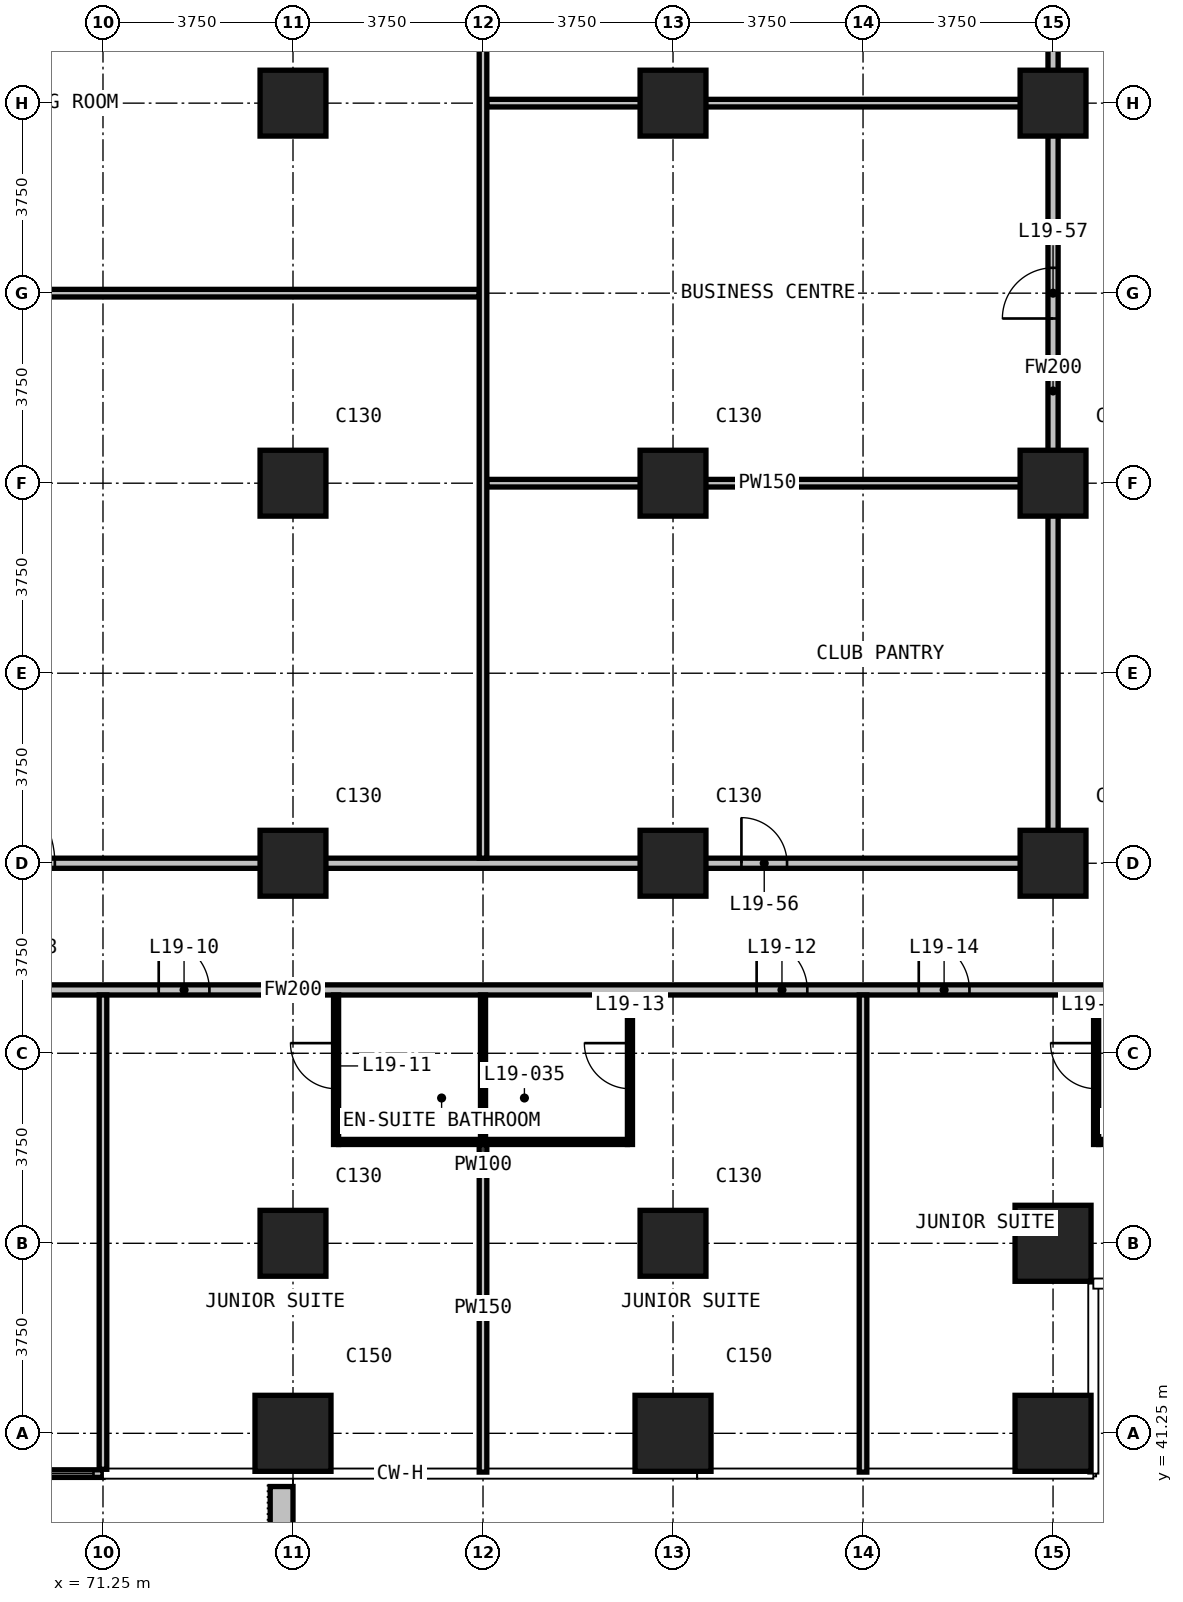
"""IFC4 building model, lengths in metres.
Left out: names, types, materials, properties, quantities, classifications, styles, units other than length and angle.
Written with IfcOpenShell. Run it as: python <this file> out.ifc"""

import sys

from ifc_helpers import new_model, si_unit, direction, frame, frame_2d, origin, origin_2d, place, context, subcontext, project, spatial, rectangle, extrude, element, fill, save


model = new_model("IFC4")
c1 = context("Model", 3, precision=1e-05, world=origin(), true_north=direction((0.0, 1.0)))
c2 = subcontext(c1, "Body", "Model", "MODEL_VIEW")
j1 = project(units=[si_unit("LENGTHUNIT", "METRE"), si_unit("PLANEANGLEUNIT", "RADIAN")], contexts=[c1])
p1 = place(None, origin())
s1 = spatial("IfcSite", under=j1, at=p1, CompositionType="ELEMENT")
p2 = place(p1, origin())
s2 = spatial("IfcBuilding", under=s1, at=p2, CompositionType="ELEMENT")
p3 = place(p2, frame((0.0, 0.0, 82.4)))
s3 = spatial("IfcBuildingStorey", under=s2, at=p3, CompositionType="ELEMENT", Elevation=82.4)
p4 = place(p3, frame((75.0, 41.25, 0.0), z_axis=(0.0, 0.0, 1.0), x_axis=(1.0, 0.0, 0.0)))
e1 = element("IfcColumn", 1, at=p4, inside=s3, PredefinedType="COLUMN", context=c2, shape_type="SweptSolid", body=[
    extrude(rectangle(XDim=1.5, YDim=1.5, at=origin_2d()), origin(), (0.0, 0.0, 1.0), 3.3),
])
for number, where, z_axis, x_axis in (
    (2, (75.0, 45.0, 0.0), (0.0, 0.0, 1.0), (1.0, 0.0, 0.0)),
    (3, (75.0, 52.5, 0.0), (0.0, 0.0, 1.0), (1.0, 0.0, 0.0)),
    (4, (75.0, 60.0, 0.0), (0.0, 0.0, 1.0), (1.0, 0.0, 0.0)),
    (5, (75.0, 67.5, 0.0), (0.0, 0.0, 1.0), (1.0, 0.0, 0.0)),
):
    element("IfcColumn", number, at=place(p3, frame(where, z_axis=z_axis, x_axis=x_axis)), inside=s3, PredefinedType="COLUMN", context=c2, shape_type="SweptSolid", body=[
        extrude(rectangle(XDim=1.3, YDim=1.3, at=origin_2d()), origin(), (0.0, 0.0, 1.0), 3.3),
    ])
p5 = place(p3, frame((82.5, 41.25, 0.0), z_axis=(0.0, 0.0, 1.0), x_axis=(1.0, 0.0, 0.0)))
e6 = element("IfcColumn", 6, at=p5, inside=s3, PredefinedType="COLUMN", context=c2, shape_type="SweptSolid", body=[
    extrude(rectangle(XDim=1.5, YDim=1.5, at=origin_2d()), origin(), (0.0, 0.0, 1.0), 3.3),
])
for number, where, z_axis, x_axis in (
    (7, (82.5, 45.0, 0.0), (0.0, 0.0, 1.0), (1.0, 0.0, 0.0)),
    (8, (82.5, 52.5, 0.0), (0.0, 0.0, 1.0), (1.0, 0.0, 0.0)),
    (9, (82.5, 60.0, 0.0), (0.0, 0.0, 1.0), (1.0, 0.0, 0.0)),
    (10, (82.5, 67.5, 0.0), (0.0, 0.0, 1.0), (1.0, 0.0, 0.0)),
):
    element("IfcColumn", number, at=place(p3, frame(where, z_axis=z_axis, x_axis=x_axis)), inside=s3, PredefinedType="COLUMN", context=c2, shape_type="SweptSolid", body=[
        extrude(rectangle(XDim=1.3, YDim=1.3, at=origin_2d()), origin(), (0.0, 0.0, 1.0), 3.3),
    ])
for number, where, z_axis, x_axis in (
    (11, (90.0, 41.25, 0.0), (0.0, 0.0, 1.0), (1.0, 0.0, 0.0)),
    (12, (90.0, 45.0, 0.0), (0.0, 0.0, 1.0), (1.0, 0.0, 0.0)),
):
    element("IfcColumn", number, at=place(p3, frame(where, z_axis=z_axis, x_axis=x_axis)), inside=s3, PredefinedType="COLUMN", context=c2, shape_type="SweptSolid", body=[
        extrude(rectangle(XDim=1.5, YDim=1.5, at=origin_2d()), origin(), (0.0, 0.0, 1.0), 3.3),
    ])
for number, where, z_axis, x_axis in (
    (13, (90.0, 52.5, 0.0), (0.0, 0.0, 1.0), (1.0, 0.0, 0.0)),
    (14, (90.0, 60.0, 0.0), (0.0, 0.0, 1.0), (1.0, 0.0, 0.0)),
    (15, (90.0, 67.5, 0.0), (0.0, 0.0, 1.0), (1.0, 0.0, 0.0)),
):
    element("IfcColumn", number, at=place(p3, frame(where, z_axis=z_axis, x_axis=x_axis)), inside=s3, PredefinedType="COLUMN", context=c2, shape_type="SweptSolid", body=[
        extrude(rectangle(XDim=1.3, YDim=1.3, at=origin_2d()), origin(), (0.0, 0.0, 1.0), 3.3),
    ])
p6 = place(p3, frame((67.5, 40.455, 0.0), z_axis=(0.0, 0.0, 1.0), x_axis=(1.0, 0.0, 0.0)))
e16 = element("IfcWall", 16, at=p6, inside=s3, PredefinedType="SOLIDWALL", context=c2, shape_type="SweptSolid", body=[
    extrude(rectangle(XDim=3.75, YDim=0.15, at=frame_2d((1.875, 0.0))), origin(), (0.0, 0.0, 1.0), 3.0),
])
p7 = place(p6, frame((1.275, 0.0, 0.0)))
e17 = element("IfcOpeningElement", 17, at=p7, cuts=e16, PredefinedType="OPENING", context=c2, shape_type="SweptSolid", body=[
    extrude(rectangle(XDim=1.2, YDim=2.4, at=frame_2d((0.6, 1.2))), frame((0.0, 0.085, 0.0), z_axis=(0.0, -1.0, 0.0), x_axis=(1.0, 0.0, 0.0)), (0.0, 0.0, 1.0), 0.17),
])
p8 = place(p6, frame((2.663, 0.0, 0.1)))
e18 = element("IfcOpeningElement", 18, at=p8, cuts=e16, PredefinedType="OPENING", context=c2, shape_type="SweptSolid", body=[
    extrude(rectangle(XDim=0.9, YDim=2.4, at=frame_2d((0.45, 1.2))), frame((0.0, 0.085, 0.0), z_axis=(0.0, -1.0, 0.0), x_axis=(1.0, 0.0, 0.0)), (0.0, 0.0, 1.0), 0.17),
])
p9 = place(p3, frame((74.775, 40.2, 0.0), z_axis=(0.0, 0.0, 1.0), x_axis=(0.0, -1.0, 0.0)))
e19 = element("IfcWall", 19, at=p9, inside=s3, PredefinedType="USERDEFINED", context=c2, shape_type="SweptSolid", body=[
    extrude(rectangle(XDim=2.35, YDim=0.45, at=frame_2d((1.175, 0.0))), origin(), (0.0, 0.0, 1.0), 1.1),
])
p10 = place(p3, frame((51.735, 50.0, 0.0), z_axis=(0.0, 0.0, 1.0), x_axis=(1.0, 0.0, 0.0)))
e20 = element("IfcWall", 20, at=p10, inside=s3, PredefinedType="PARTITIONING", context=c2, shape_type="SweptSolid", body=[
    extrude(rectangle(XDim=46.53, YDim=0.2, at=frame_2d((23.265, 0.0))), origin(), (0.0, 0.0, 1.0), 3.0),
])
p11 = place(p10, frame((5.615, 0.0, 0.0)))
e21 = element("IfcOpeningElement", 21, at=p11, cuts=e20, PredefinedType="OPENING", context=c2, shape_type="SweptSolid", body=[
    extrude(rectangle(XDim=1.0, YDim=2.2, at=frame_2d((0.5, 1.1))), frame((0.0, 0.11, 0.0), z_axis=(0.0, -1.0, 0.0), x_axis=(1.0, 0.0, 0.0)), (0.0, 0.0, 1.0), 0.22),
])
p12 = place(p10, frame((17.415, 0.0, 0.0)))
e22 = element("IfcOpeningElement", 22, at=p12, cuts=e20, PredefinedType="OPENING", context=c2, shape_type="SweptSolid", body=[
    extrude(rectangle(XDim=1.0, YDim=2.2, at=frame_2d((0.5, 1.1))), frame((0.0, 0.11, 0.0), z_axis=(0.0, -1.0, 0.0), x_axis=(1.0, 0.0, 0.0)), (0.0, 0.0, 1.0), 0.22),
])
p13 = place(p10, frame((20.615, 0.0, 0.0)))
e23 = element("IfcOpeningElement", 23, at=p13, cuts=e20, PredefinedType="OPENING", context=c2, shape_type="SweptSolid", body=[
    extrude(rectangle(XDim=1.0, YDim=2.2, at=frame_2d((0.5, 1.1))), frame((0.0, 0.11, 0.0), z_axis=(0.0, -1.0, 0.0), x_axis=(1.0, 0.0, 0.0)), (0.0, 0.0, 1.0), 0.22),
])
p14 = place(p10, frame((32.415, 0.0, 0.0)))
e24 = element("IfcOpeningElement", 24, at=p14, cuts=e20, PredefinedType="OPENING", context=c2, shape_type="SweptSolid", body=[
    extrude(rectangle(XDim=1.0, YDim=2.2, at=frame_2d((0.5, 1.1))), frame((0.0, 0.11, 0.0), z_axis=(0.0, -1.0, 0.0), x_axis=(1.0, 0.0, 0.0)), (0.0, 0.0, 1.0), 0.22),
])
p15 = place(p10, frame((35.615, 0.0, 0.0)))
e25 = element("IfcOpeningElement", 25, at=p15, cuts=e20, PredefinedType="OPENING", context=c2, shape_type="SweptSolid", body=[
    extrude(rectangle(XDim=1.0, YDim=2.2, at=frame_2d((0.5, 1.1))), frame((0.0, 0.11, 0.0), z_axis=(0.0, -1.0, 0.0), x_axis=(1.0, 0.0, 0.0)), (0.0, 0.0, 1.0), 0.22),
])
p16 = place(p10, frame((1.8, 0.0, 0.0)))
e26 = element("IfcOpeningElement", 26, at=p16, cuts=e20, PredefinedType="OPENING", context=c2, shape_type="SweptSolid", body=[
    extrude(rectangle(XDim=0.9, YDim=2.2, at=frame_2d((0.45, 1.1))), frame((0.0, 0.11, 0.0), z_axis=(0.0, -1.0, 0.0), x_axis=(1.0, 0.0, 0.0)), (0.0, 0.0, 1.0), 0.22),
])
p17 = place(p10, frame((43.815, 0.0, 0.0)))
e27 = element("IfcOpeningElement", 27, at=p17, cuts=e20, PredefinedType="OPENING", context=c2, shape_type="SweptSolid", body=[
    extrude(rectangle(XDim=0.9, YDim=2.2, at=frame_2d((0.45, 1.1))), frame((0.0, 0.11, 0.0), z_axis=(0.0, -1.0, 0.0), x_axis=(1.0, 0.0, 0.0)), (0.0, 0.0, 1.0), 0.22),
])
p18 = place(p3, frame((60.1, 52.5, 0.0), z_axis=(0.0, 0.0, 1.0), x_axis=(1.0, 0.0, 0.0)))
e28 = element("IfcWall", 28, at=p18, inside=s3, PredefinedType="PARTITIONING", context=c2, shape_type="SweptSolid", body=[
    extrude(rectangle(XDim=29.8, YDim=0.2, at=frame_2d((14.9, 0.0))), origin(), (0.0, 0.0, 1.0), 3.0),
])
p19 = place(p18, frame((8.4, 0.0, 0.0)))
e29 = element("IfcOpeningElement", 29, at=p19, cuts=e28, PredefinedType="OPENING", context=c2, shape_type="SweptSolid", body=[
    extrude(rectangle(XDim=1.8, YDim=2.2, at=frame_2d((0.9, 1.1))), frame((0.0, 0.11, 0.0), z_axis=(0.0, -1.0, 0.0), x_axis=(1.0, 0.0, 0.0)), (0.0, 0.0, 1.0), 0.22),
])
p20 = place(p18, frame((23.75, 0.0, 0.0)))
e30 = element("IfcOpeningElement", 30, at=p20, cuts=e28, PredefinedType="OPENING", context=c2, shape_type="SweptSolid", body=[
    extrude(rectangle(XDim=0.9, YDim=2.2, at=frame_2d((0.45, 1.1))), frame((0.0, 0.11, 0.0), z_axis=(0.0, -1.0, 0.0), x_axis=(1.0, 0.0, 0.0)), (0.0, 0.0, 1.0), 0.22),
])
p21 = place(p3, frame((90.0, 52.4, 0.0), z_axis=(0.0, 0.0, 1.0), x_axis=(0.0, 1.0, 0.0)))
e31 = element("IfcWall", 31, at=p21, inside=s3, PredefinedType="PARTITIONING", context=c2, shape_type="SweptSolid", body=[
    extrude(rectangle(XDim=18.84, YDim=0.2, at=frame_2d((9.42, 0.0))), origin(), (0.0, 0.0, 1.0), 3.0),
])
p22 = place(p21, frame((10.85, 0.0, 0.0)))
e32 = element("IfcOpeningElement", 32, at=p22, cuts=e31, PredefinedType="OPENING", context=c2, shape_type="SweptSolid", body=[
    extrude(rectangle(XDim=1.0, YDim=2.2, at=frame_2d((0.5, 1.1))), frame((0.0, 0.11, 0.0), z_axis=(0.0, -1.0, 0.0), x_axis=(1.0, 0.0, 0.0)), (0.0, 0.0, 1.0), 0.22),
])
p23 = place(p21, frame((16.5, 0.0, 0.0)))
e33 = element("IfcOpeningElement", 33, at=p23, cuts=e31, PredefinedType="OPENING", context=c2, shape_type="SweptSolid", body=[
    extrude(rectangle(XDim=0.9, YDim=2.2, at=frame_2d((0.45, 1.1))), frame((0.0, 0.11, 0.0), z_axis=(0.0, -1.0, 0.0), x_axis=(1.0, 0.0, 0.0)), (0.0, 0.0, 1.0), 0.22),
])
p24 = place(p3, frame((78.825, 60.0, 0.0), z_axis=(0.0, 0.0, 1.0), x_axis=(1.0, 0.0, 0.0)))
e34 = element("IfcWall", 34, at=p24, inside=s3, PredefinedType="PARTITIONING", context=c2, shape_type="SweptSolid", body=[
    extrude(rectangle(XDim=11.075, YDim=0.15, at=frame_2d((5.538, 0.0))), origin(), (0.0, 0.0, 1.0), 3.0),
])
p25 = place(p3, frame((60.1, 63.75, 0.0), z_axis=(0.0, 0.0, 1.0), x_axis=(1.0, 0.0, 0.0)))
e35 = element("IfcWall", 35, at=p25, inside=s3, PredefinedType="PARTITIONING", context=c2, shape_type="SweptSolid", body=[
    extrude(rectangle(XDim=18.575, YDim=0.15, at=frame_2d((9.288, 0.0))), origin(), (0.0, 0.0, 1.0), 3.0),
])
p26 = place(p3, frame((78.825, 67.5, 0.0), z_axis=(0.0, 0.0, 1.0), x_axis=(1.0, 0.0, 0.0)))
e36 = element("IfcWall", 36, at=p26, inside=s3, PredefinedType="PARTITIONING", context=c2, shape_type="SweptSolid", body=[
    extrude(rectangle(XDim=11.075, YDim=0.15, at=frame_2d((5.538, 0.0))), origin(), (0.0, 0.0, 1.0), 3.0),
])
p27 = place(p3, frame((71.25, 40.54, 0.0), z_axis=(0.0, 0.0, 1.0), x_axis=(0.0, 1.0, 0.0)))
e37 = element("IfcWall", 37, at=p27, inside=s3, PredefinedType="PARTITIONING", context=c2, shape_type="SweptSolid", body=[
    extrude(rectangle(XDim=9.36, YDim=0.15, at=frame_2d((4.68, 0.0))), origin(), (0.0, 0.0, 1.0), 3.0),
])
p28 = place(p3, frame((78.75, 40.485, 0.0), z_axis=(0.0, 0.0, 1.0), x_axis=(0.0, 1.0, 0.0)))
e38 = element("IfcWall", 38, at=p28, inside=s3, PredefinedType="PARTITIONING", context=c2, shape_type="SweptSolid", body=[
    extrude(rectangle(XDim=6.465, YDim=0.15, at=frame_2d((3.232, 0.0))), origin(), (0.0, 0.0, 1.0), 3.0),
])
p29 = place(p3, frame((78.75, 52.6, 0.0), z_axis=(0.0, 0.0, 1.0), x_axis=(0.0, 1.0, 0.0)))
e39 = element("IfcWall", 39, at=p29, inside=s3, PredefinedType="PARTITIONING", context=c2, shape_type="SweptSolid", body=[
    extrude(rectangle(XDim=18.64, YDim=0.15, at=frame_2d((9.32, 0.0))), origin(), (0.0, 0.0, 1.0), 3.0),
])
p30 = place(p3, frame((86.25, 40.485, 0.0), z_axis=(0.0, 0.0, 1.0), x_axis=(0.0, 1.0, 0.0)))
e40 = element("IfcWall", 40, at=p30, inside=s3, PredefinedType="PARTITIONING", context=c2, shape_type="SweptSolid", body=[
    extrude(rectangle(XDim=9.415, YDim=0.15, at=frame_2d((4.708, 0.0))), origin(), (0.0, 0.0, 1.0), 3.0),
])
p31 = place(p3, frame((75.9, 47.0, 0.0), z_axis=(0.0, 0.0, 1.0), x_axis=(1.0, 0.0, 0.0)))
e41 = element("IfcWall", 41, at=p31, inside=s3, PredefinedType="PARTITIONING", context=c2, shape_type="SweptSolid", body=[
    extrude(rectangle(XDim=5.7, YDim=0.1, at=frame_2d((2.85, 0.0))), origin(), (0.0, 0.0, 1.0), 3.0),
])
p32 = place(p3, frame((90.9, 47.0, 0.0), z_axis=(0.0, 0.0, 1.0), x_axis=(1.0, 0.0, 0.0)))
e42 = element("IfcWall", 42, at=p32, inside=s3, PredefinedType="PARTITIONING", context=c2, shape_type="SweptSolid", body=[
    extrude(rectangle(XDim=2.775, YDim=0.1, at=frame_2d((1.388, 0.0))), origin(), (0.0, 0.0, 1.0), 3.0),
])
p33 = place(p3, frame((75.85, 46.95, 0.0), z_axis=(0.0, 0.0, 1.0), x_axis=(0.0, 1.0, 0.0)))
e43 = element("IfcWall", 43, at=p33, inside=s3, PredefinedType="PARTITIONING", context=c2, shape_type="SweptSolid", body=[
    extrude(rectangle(XDim=2.95, YDim=0.1, at=frame_2d((1.475, 0.0))), origin(), (0.0, 0.0, 1.0), 3.0),
])
p34 = place(p33, frame((1.1, 0.0, 0.0)))
e44 = element("IfcOpeningElement", 44, at=p34, cuts=e43, PredefinedType="OPENING", context=c2, shape_type="SweptSolid", body=[
    extrude(rectangle(XDim=0.9, YDim=2.2, at=frame_2d((0.45, 1.1))), frame((0.0, 0.06, 0.0), z_axis=(0.0, -1.0, 0.0), x_axis=(1.0, 0.0, 0.0)), (0.0, 0.0, 1.0), 0.12),
])
p35 = place(p3, frame((78.75, 47.05, 0.0), z_axis=(0.0, 0.0, 1.0), x_axis=(0.0, 1.0, 0.0)))
e45 = element("IfcWall", 45, at=p35, inside=s3, PredefinedType="PARTITIONING", context=c2, shape_type="SweptSolid", body=[
    extrude(rectangle(XDim=2.85, YDim=0.1, at=frame_2d((1.425, 0.0))), origin(), (0.0, 0.0, 1.0), 3.0),
])
p36 = place(p3, frame((81.65, 46.95, 0.0), z_axis=(0.0, 0.0, 1.0), x_axis=(0.0, 1.0, 0.0)))
e46 = element("IfcWall", 46, at=p36, inside=s3, PredefinedType="PARTITIONING", context=c2, shape_type="SweptSolid", body=[
    extrude(rectangle(XDim=2.95, YDim=0.1, at=frame_2d((1.475, 0.0))), origin(), (0.0, 0.0, 1.0), 3.0),
])
p37 = place(p36, frame((1.1, 0.0, 0.0)))
e47 = element("IfcOpeningElement", 47, at=p37, cuts=e46, PredefinedType="OPENING", context=c2, shape_type="SweptSolid", body=[
    extrude(rectangle(XDim=0.9, YDim=2.2, at=frame_2d((0.45, 1.1))), frame((0.0, 0.06, 0.0), z_axis=(0.0, -1.0, 0.0), x_axis=(1.0, 0.0, 0.0)), (0.0, 0.0, 1.0), 0.12),
])
p38 = place(p3, frame((90.85, 46.95, 0.0), z_axis=(0.0, 0.0, 1.0), x_axis=(0.0, 1.0, 0.0)))
e48 = element("IfcWall", 48, at=p38, inside=s3, PredefinedType="PARTITIONING", context=c2, shape_type="SweptSolid", body=[
    extrude(rectangle(XDim=2.95, YDim=0.1, at=frame_2d((1.475, 0.0))), origin(), (0.0, 0.0, 1.0), 3.0),
])
p39 = place(p38, frame((1.1, 0.0, 0.0)))
e49 = element("IfcOpeningElement", 49, at=p39, cuts=e48, PredefinedType="OPENING", context=c2, shape_type="SweptSolid", body=[
    extrude(rectangle(XDim=0.9, YDim=2.2, at=frame_2d((0.45, 1.1))), frame((0.0, 0.06, 0.0), z_axis=(0.0, -1.0, 0.0), x_axis=(1.0, 0.0, 0.0)), (0.0, 0.0, 1.0), 0.12),
])
p40 = place(p8, origin())
e50 = element("IfcWindow", 50, at=p40, inside=s3, PartitioningType="SINGLE_PANEL", PredefinedType="WINDOW", context=c2, shape_type="SweptSolid", body=[
    extrude(rectangle(XDim=0.9, YDim=2.4, at=frame_2d((0.45, 1.2))), frame((0.0, 0.03, 0.0), z_axis=(0.0, -1.0, 0.0), x_axis=(1.0, 0.0, 0.0)), (0.0, 0.0, 1.0), 0.06),
])
fill(e18, e50)
p41 = place(p13, origin())
e51 = element("IfcDoor", 51, at=p41, inside=s3, OperationType="SINGLE_SWING_RIGHT", PredefinedType="DOOR", context=c2, shape_type="SweptSolid", body=[
    extrude(rectangle(XDim=1.0, YDim=2.2, at=frame_2d((0.5, 1.1))), frame((0.0, 0.025, 0.0), z_axis=(0.0, -1.0, 0.0), x_axis=(1.0, 0.0, 0.0)), (0.0, 0.0, 1.0), 0.05),
])
fill(e23, e51)
p42 = place(p34, origin())
e52 = element("IfcDoor", 52, at=p42, inside=s3, OperationType="SINGLE_SWING_RIGHT", PredefinedType="DOOR", context=c2, shape_type="SweptSolid", body=[
    extrude(rectangle(XDim=0.9, YDim=2.2, at=frame_2d((0.45, 1.1))), frame((0.0, 0.025, 0.0), z_axis=(0.0, -1.0, 0.0), x_axis=(1.0, 0.0, 0.0)), (0.0, 0.0, 1.0), 0.05),
])
fill(e44, e52)
p43 = place(p14, origin())
e53 = element("IfcDoor", 53, at=p43, inside=s3, OperationType="SINGLE_SWING_LEFT", PredefinedType="DOOR", context=c2, shape_type="SweptSolid", body=[
    extrude(rectangle(XDim=1.0, YDim=2.2, at=frame_2d((0.5, 1.1))), frame((0.0, 0.025, 0.0), z_axis=(0.0, -1.0, 0.0), x_axis=(1.0, 0.0, 0.0)), (0.0, 0.0, 1.0), 0.05),
])
fill(e24, e53)
p44 = place(p37, origin())
e54 = element("IfcDoor", 54, at=p44, inside=s3, OperationType="SINGLE_SWING_RIGHT", PredefinedType="DOOR", context=c2, shape_type="SweptSolid", body=[
    extrude(rectangle(XDim=0.9, YDim=2.2, at=frame_2d((0.45, 1.1))), frame((0.0, 0.025, 0.0), z_axis=(0.0, -1.0, 0.0), x_axis=(1.0, 0.0, 0.0)), (0.0, 0.0, 1.0), 0.05),
])
fill(e47, e54)
p45 = place(p15, origin())
e55 = element("IfcDoor", 55, at=p45, inside=s3, OperationType="SINGLE_SWING_LEFT", PredefinedType="DOOR", context=c2, shape_type="SweptSolid", body=[
    extrude(rectangle(XDim=1.0, YDim=2.2, at=frame_2d((0.5, 1.1))), frame((0.0, 0.025, 0.0), z_axis=(0.0, -1.0, 0.0), x_axis=(1.0, 0.0, 0.0)), (0.0, 0.0, 1.0), 0.05),
])
fill(e25, e55)
p46 = place(p39, origin())
e56 = element("IfcDoor", 56, at=p46, inside=s3, OperationType="SINGLE_SWING_RIGHT", PredefinedType="DOOR", context=c2, shape_type="SweptSolid", body=[
    extrude(rectangle(XDim=0.9, YDim=2.2, at=frame_2d((0.45, 1.1))), frame((0.0, 0.025, 0.0), z_axis=(0.0, -1.0, 0.0), x_axis=(1.0, 0.0, 0.0)), (0.0, 0.0, 1.0), 0.05),
])
fill(e49, e56)
p47 = place(p19, origin())
e57 = element("IfcDoor", 57, at=p47, inside=s3, OperationType="DOUBLE_DOOR_SINGLE_SWING", PredefinedType="DOOR", context=c2, shape_type="SweptSolid", body=[
    extrude(rectangle(XDim=1.8, YDim=2.2, at=frame_2d((0.9, 1.1))), frame((0.0, 0.025, 0.0), z_axis=(0.0, -1.0, 0.0), x_axis=(1.0, 0.0, 0.0)), (0.0, 0.0, 1.0), 0.05),
])
fill(e29, e57)
p48 = place(p20, origin())
e58 = element("IfcDoor", 58, at=p48, inside=s3, OperationType="SINGLE_SWING_LEFT", PredefinedType="DOOR", context=c2, shape_type="SweptSolid", body=[
    extrude(rectangle(XDim=0.9, YDim=2.2, at=frame_2d((0.45, 1.1))), frame((0.0, 0.025, 0.0), z_axis=(0.0, -1.0, 0.0), x_axis=(1.0, 0.0, 0.0)), (0.0, 0.0, 1.0), 0.05),
])
fill(e30, e58)
p49 = place(p22, origin())
e59 = element("IfcDoor", 59, at=p49, inside=s3, OperationType="SINGLE_SWING_LEFT", PredefinedType="DOOR", context=c2, shape_type="SweptSolid", body=[
    extrude(rectangle(XDim=1.0, YDim=2.2, at=frame_2d((0.5, 1.1))), frame((0.0, 0.025, 0.0), z_axis=(0.0, -1.0, 0.0), x_axis=(1.0, 0.0, 0.0)), (0.0, 0.0, 1.0), 0.05),
])
fill(e32, e59)
save(model, sys.argv[1])
